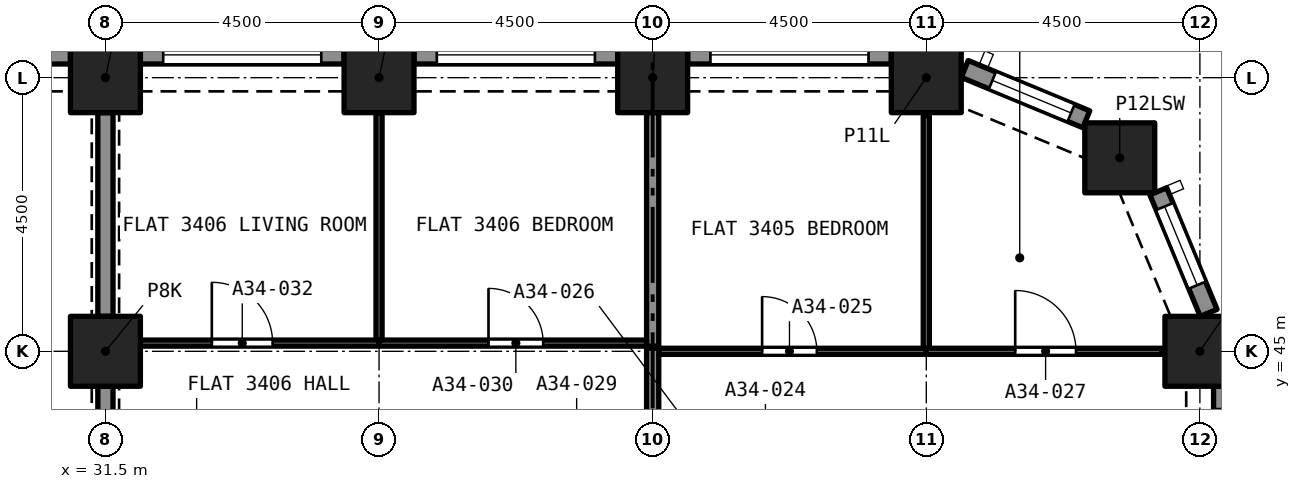
"""IFC4 building model, lengths in metres.
Left out: names, types, materials, properties, quantities, classifications, styles, units other than length and angle.
Written with IfcOpenShell. Run it as: python <this file> out.ifc"""

import sys

from ifc_helpers import new_model, si_unit, direction, frame, frame_2d, origin, origin_2d, place, context, subcontext, project, spatial, rectangle, extrude, element, fill, save


model = new_model("IFC4")
c1 = context("Model", 3, precision=1e-05, world=origin(), true_north=direction((0.0, 1.0)))
c2 = subcontext(c1, "Body", "Model", "MODEL_VIEW")
j1 = project(units=[si_unit("LENGTHUNIT", "METRE"), si_unit("PLANEANGLEUNIT", "RADIAN")], contexts=[c1])
p1 = place(None, origin())
s1 = spatial("IfcSite", under=j1, at=p1, CompositionType="ELEMENT")
p2 = place(p1, origin())
s2 = spatial("IfcBuilding", under=s1, at=p2, CompositionType="ELEMENT")
p3 = place(p2, frame((0.0, 0.0, 121.6)))
s3 = spatial("IfcBuildingStorey", under=s2, at=p3, CompositionType="ELEMENT", Elevation=121.6)
for number, where, z_axis, x_axis in (
    (1, (31.5, 45.0, 0.0), (0.0, 0.0, 1.0), (1.0, 0.0, 0.0)),
    (2, (49.5, 45.0, 0.0), (0.0, 0.0, 1.0), (1.0, 0.0, 0.0)),
    (3, (48.182, 48.182, 0.0), (0.0, 0.0, 1.0), (1.0, 0.0, 0.0)),
    (4, (31.5, 49.5, 0.0), (0.0, 0.0, 1.0), (1.0, 0.0, 0.0)),
    (5, (36.0, 49.5, 0.0), (0.0, 0.0, 1.0), (1.0, 0.0, 0.0)),
    (6, (40.5, 49.5, 0.0), (0.0, 0.0, 1.0), (1.0, 0.0, 0.0)),
    (7, (45.0, 49.5, 0.0), (0.0, 0.0, 1.0), (1.0, 0.0, 0.0)),
):
    element("IfcColumn", number, at=place(p3, frame(where, z_axis=z_axis, x_axis=x_axis)), inside=s3, PredefinedType="COLUMN", context=c2, shape_type="SweptSolid", body=[
        extrude(rectangle(XDim=1.15, YDim=1.15, at=origin_2d()), origin(), (0.0, 0.0, 1.0), 3.2),
    ])
p4 = place(p3, frame((49.875, 44.425, 0.0), z_axis=(0.0, 0.0, 1.0), x_axis=(0.0, -1.0, 0.0)))
e8 = element("IfcWall", 8, at=p4, inside=s3, PredefinedType="SOLIDWALL", context=c2, shape_type="SweptSolid", body=[
    extrude(rectangle(XDim=3.35, YDim=0.3, at=frame_2d((1.675, 0.0))), origin(), (0.0, 0.0, 1.0), 3.2),
])
p5 = place(p4, frame((0.375, 0.0, 0.45)))
e9 = element("IfcOpeningElement", 9, at=p5, cuts=e8, PredefinedType="OPENING", context=c2, shape_type="SweptSolid", body=[
    extrude(rectangle(XDim=2.6, YDim=1.95, at=frame_2d((1.3, 0.975))), frame((0.0, 0.16, 0.0), z_axis=(0.0, -1.0, 0.0), x_axis=(1.0, 0.0, 0.0)), (0.0, 0.0, 1.0), 0.32),
])
p6 = place(p3, frame((48.816, 47.631, 0.0), z_axis=(0.0, 0.0, 1.0), x_axis=(0.382723818695, -0.923862802911, 0.0)))
e10 = element("IfcWall", 10, at=p6, inside=s3, PredefinedType="SOLIDWALL", context=c2, shape_type="SweptSolid", body=[
    extrude(rectangle(XDim=2.164, YDim=0.3, at=frame_2d((1.082, 0.0))), origin(), (0.0, 0.0, 1.0), 3.2),
])
p7 = place(p6, frame((0.271, 0.0, 0.45)))
e11 = element("IfcOpeningElement", 11, at=p7, cuts=e10, PredefinedType="OPENING", context=c2, shape_type="SweptSolid", body=[
    extrude(rectangle(XDim=1.4, YDim=1.95, at=frame_2d((0.7, 0.975))), frame((0.0, 0.16, 0.0), z_axis=(0.0, -1.0, 0.0), x_axis=(1.0, 0.0, 0.0)), (0.0, 0.0, 1.0), 0.32),
])
p8 = place(p3, frame((45.632, 49.644, 0.0), z_axis=(0.0, 0.0, 1.0), x_axis=(0.923862802911, -0.382723818695, 0.0)))
e12 = element("IfcWall", 12, at=p8, inside=s3, PredefinedType="SOLIDWALL", context=c2, shape_type="SweptSolid", body=[
    extrude(rectangle(XDim=2.164, YDim=0.3, at=frame_2d((1.082, 0.0))), origin(), (0.0, 0.0, 1.0), 3.2),
])
p9 = place(p8, frame((0.493, 0.0, 0.45)))
e13 = element("IfcOpeningElement", 13, at=p9, cuts=e12, PredefinedType="OPENING", context=c2, shape_type="SweptSolid", body=[
    extrude(rectangle(XDim=1.4, YDim=1.95, at=frame_2d((0.7, 0.975))), frame((0.0, 0.16, 0.0), z_axis=(0.0, -1.0, 0.0), x_axis=(1.0, 0.0, 0.0)), (0.0, 0.0, 1.0), 0.32),
])
p10 = place(p3, frame((41.075, 49.875, 0.0), z_axis=(0.0, 0.0, 1.0), x_axis=(1.0, 0.0, 0.0)))
e14 = element("IfcWall", 14, at=p10, inside=s3, PredefinedType="SOLIDWALL", context=c2, shape_type="SweptSolid", body=[
    extrude(rectangle(XDim=3.35, YDim=0.3, at=frame_2d((1.675, 0.0))), origin(), (0.0, 0.0, 1.0), 3.2),
])
p11 = place(p10, frame((0.375, 0.0, 0.45)))
e15 = element("IfcOpeningElement", 15, at=p11, cuts=e14, PredefinedType="OPENING", context=c2, shape_type="SweptSolid", body=[
    extrude(rectangle(XDim=2.6, YDim=1.95, at=frame_2d((1.3, 0.975))), frame((0.0, 0.16, 0.0), z_axis=(0.0, -1.0, 0.0), x_axis=(1.0, 0.0, 0.0)), (0.0, 0.0, 1.0), 0.32),
])
p12 = place(p3, frame((36.575, 49.875, 0.0), z_axis=(0.0, 0.0, 1.0), x_axis=(1.0, 0.0, 0.0)))
e16 = element("IfcWall", 16, at=p12, inside=s3, PredefinedType="SOLIDWALL", context=c2, shape_type="SweptSolid", body=[
    extrude(rectangle(XDim=3.35, YDim=0.3, at=frame_2d((1.675, 0.0))), origin(), (0.0, 0.0, 1.0), 3.2),
])
p13 = place(p12, frame((0.375, 0.0, 0.45)))
e17 = element("IfcOpeningElement", 17, at=p13, cuts=e16, PredefinedType="OPENING", context=c2, shape_type="SweptSolid", body=[
    extrude(rectangle(XDim=2.6, YDim=1.95, at=frame_2d((1.3, 0.975))), frame((0.0, 0.16, 0.0), z_axis=(0.0, -1.0, 0.0), x_axis=(1.0, 0.0, 0.0)), (0.0, 0.0, 1.0), 0.32),
])
p14 = place(p3, frame((32.075, 49.875, 0.0), z_axis=(0.0, 0.0, 1.0), x_axis=(1.0, 0.0, 0.0)))
e18 = element("IfcWall", 18, at=p14, inside=s3, PredefinedType="SOLIDWALL", context=c2, shape_type="SweptSolid", body=[
    extrude(rectangle(XDim=3.35, YDim=0.3, at=frame_2d((1.675, 0.0))), origin(), (0.0, 0.0, 1.0), 3.2),
])
p15 = place(p14, frame((0.375, 0.0, 0.45)))
e19 = element("IfcOpeningElement", 19, at=p15, cuts=e18, PredefinedType="OPENING", context=c2, shape_type="SweptSolid", body=[
    extrude(rectangle(XDim=2.6, YDim=1.95, at=frame_2d((1.3, 0.975))), frame((0.0, 0.16, 0.0), z_axis=(0.0, -1.0, 0.0), x_axis=(1.0, 0.0, 0.0)), (0.0, 0.0, 1.0), 0.32),
])
p16 = place(p3, frame((27.575, 49.875, 0.0), z_axis=(0.0, 0.0, 1.0), x_axis=(1.0, 0.0, 0.0)))
e20 = element("IfcWall", 20, at=p16, inside=s3, PredefinedType="SOLIDWALL", context=c2, shape_type="SweptSolid", body=[
    extrude(rectangle(XDim=3.35, YDim=0.3, at=frame_2d((1.675, 0.0))), origin(), (0.0, 0.0, 1.0), 3.2),
])
p17 = place(p16, frame((0.375, 0.0, 0.45)))
e21 = element("IfcOpeningElement", 21, at=p17, cuts=e20, PredefinedType="OPENING", context=c2, shape_type="SweptSolid", body=[
    extrude(rectangle(XDim=2.6, YDim=1.95, at=frame_2d((1.3, 0.975))), frame((0.0, 0.16, 0.0), z_axis=(0.0, -1.0, 0.0), x_axis=(1.0, 0.0, 0.0)), (0.0, 0.0, 1.0), 0.32),
])
p18 = place(p3, frame((40.6, 45.0, 0.0), z_axis=(0.0, 0.0, 1.0), x_axis=(1.0, 0.0, 0.0)))
e22 = element("IfcWall", 22, at=p18, inside=s3, PredefinedType="PARTITIONING", context=c2, shape_type="SweptSolid", body=[
    extrude(rectangle(XDim=4.4, YDim=0.1, at=frame_2d((2.2, 0.0))), origin(), (0.0, 0.0, 1.0), 2.85),
])
p19 = place(p18, frame((1.7, 0.0, 0.0)))
e23 = element("IfcOpeningElement", 23, at=p19, cuts=e22, PredefinedType="OPENING", context=c2, shape_type="SweptSolid", body=[
    extrude(rectangle(XDim=0.9, YDim=2.1, at=frame_2d((0.45, 1.05))), frame((0.0, 0.06, 0.0), z_axis=(0.0, -1.0, 0.0), x_axis=(1.0, 0.0, 0.0)), (0.0, 0.0, 1.0), 0.12),
])
p20 = place(p3, frame((45.0, 45.05, 0.0), z_axis=(0.0, 0.0, 1.0), x_axis=(0.0, 1.0, 0.0)))
e24 = element("IfcWall", 24, at=p20, inside=s3, PredefinedType="PARTITIONING", context=c2, shape_type="SweptSolid", body=[
    extrude(rectangle(XDim=3.828, YDim=0.1, at=frame_2d((1.914, 0.0))), origin(), (0.0, 0.0, 1.0), 2.85),
])
p21 = place(p3, frame((40.5, 45.085, 0.0), z_axis=(0.0, 0.0, 1.0), x_axis=(0.0, 1.0, 0.0)))
e25 = element("IfcWall", 25, at=p21, inside=s3, PredefinedType="PARTITIONING", context=c2, shape_type="SweptSolid", body=[
    extrude(rectangle(XDim=3.84, YDim=0.2, at=frame_2d((1.92, 0.0))), origin(), (0.0, 0.0, 1.0), 2.85),
])
p22 = place(p3, frame((45.0, 45.0, 0.0), z_axis=(0.0, 0.0, 1.0), x_axis=(1.0, 0.0, 0.0)))
e26 = element("IfcWall", 26, at=p22, inside=s3, PredefinedType="PARTITIONING", context=c2, shape_type="SweptSolid", body=[
    extrude(rectangle(XDim=3.878, YDim=0.1, at=frame_2d((1.939, 0.0))), origin(), (0.0, 0.0, 1.0), 2.85),
])
p23 = place(p22, frame((1.462, 0.0, 0.0)))
e27 = element("IfcOpeningElement", 27, at=p23, cuts=e26, PredefinedType="OPENING", context=c2, shape_type="SweptSolid", body=[
    extrude(rectangle(XDim=1.0, YDim=2.1, at=frame_2d((0.5, 1.05))), frame((0.0, 0.06, 0.0), z_axis=(0.0, -1.0, 0.0), x_axis=(1.0, 0.0, 0.0)), (0.0, 0.0, 1.0), 0.12),
])
p24 = place(p3, frame((40.5, 43.692, 0.0), z_axis=(0.0, 0.0, 1.0), x_axis=(0.0, 1.0, 0.0)))
e28 = element("IfcWall", 28, at=p24, inside=s3, PredefinedType="PARTITIONING", context=c2, shape_type="SweptSolid", body=[
    extrude(rectangle(XDim=1.358, YDim=0.2, at=frame_2d((0.679, 0.0))), origin(), (0.0, 0.0, 1.0), 2.85),
])
p25 = place(p3, frame((36.0, 45.135, 0.0), z_axis=(0.0, 0.0, 1.0), x_axis=(1.0, 0.0, 0.0)))
e29 = element("IfcWall", 29, at=p25, inside=s3, PredefinedType="PARTITIONING", context=c2, shape_type="SweptSolid", body=[
    extrude(rectangle(XDim=4.4, YDim=0.1, at=frame_2d((2.2, 0.0))), origin(), (0.0, 0.0, 1.0), 2.85),
])
p26 = place(p25, frame((1.8, 0.0, 0.0)))
e30 = element("IfcOpeningElement", 30, at=p26, cuts=e29, PredefinedType="OPENING", context=c2, shape_type="SweptSolid", body=[
    extrude(rectangle(XDim=0.9, YDim=2.1, at=frame_2d((0.45, 1.05))), frame((0.0, 0.06, 0.0), z_axis=(0.0, -1.0, 0.0), x_axis=(1.0, 0.0, 0.0)), (0.0, 0.0, 1.0), 0.12),
])
p27 = place(p3, frame((36.0, 45.185, 0.0), z_axis=(0.0, 0.0, 1.0), x_axis=(0.0, 1.0, 0.0)))
e31 = element("IfcWall", 31, at=p27, inside=s3, PredefinedType="PARTITIONING", context=c2, shape_type="SweptSolid", body=[
    extrude(rectangle(XDim=3.74, YDim=0.1, at=frame_2d((1.87, 0.0))), origin(), (0.0, 0.0, 1.0), 2.85),
])
p28 = place(p3, frame((32.075, 45.135, 0.0), z_axis=(0.0, 0.0, 1.0), x_axis=(1.0, 0.0, 0.0)))
e32 = element("IfcWall", 32, at=p28, inside=s3, PredefinedType="PARTITIONING", context=c2, shape_type="SweptSolid", body=[
    extrude(rectangle(XDim=3.925, YDim=0.1, at=frame_2d((1.962, 0.0))), origin(), (0.0, 0.0, 1.0), 2.85),
])
p29 = place(p28, frame((1.175, 0.0, 0.0)))
e33 = element("IfcOpeningElement", 33, at=p29, cuts=e32, PredefinedType="OPENING", context=c2, shape_type="SweptSolid", body=[
    extrude(rectangle(XDim=1.0, YDim=2.1, at=frame_2d((0.5, 1.05))), frame((0.0, 0.06, 0.0), z_axis=(0.0, -1.0, 0.0), x_axis=(1.0, 0.0, 0.0)), (0.0, 0.0, 1.0), 0.12),
])
for number, where, z_axis, x_axis in (
    (34, (31.5, 41.075, 0.0), (0.0, 0.0, 1.0), (0.0, 1.0, 0.0)),
    (35, (31.5, 45.575, 0.0), (0.0, 0.0, 1.0), (0.0, 1.0, 0.0)),
):
    element("IfcWall", number, at=place(p3, frame(where, z_axis=z_axis, x_axis=x_axis)), inside=s3, PredefinedType="PARTITIONING", context=c2, shape_type="SweptSolid", body=[
        extrude(rectangle(XDim=3.35, YDim=0.25, at=frame_2d((1.675, 0.0))), origin(), (0.0, 0.0, 1.0), 2.38),
    ])
p30 = place(p7, origin())
e36 = element("IfcWindow", 36, at=p30, inside=s3, PartitioningType="SINGLE_PANEL", PredefinedType="WINDOW", context=c2, shape_type="SweptSolid", body=[
    extrude(rectangle(XDim=1.4, YDim=1.95, at=frame_2d((0.7, 0.975))), frame((0.0, 0.03, 0.0), z_axis=(0.0, -1.0, 0.0), x_axis=(1.0, 0.0, 0.0)), (0.0, 0.0, 1.0), 0.06),
])
fill(e11, e36)
p31 = place(p9, origin())
e37 = element("IfcWindow", 37, at=p31, inside=s3, PartitioningType="SINGLE_PANEL", PredefinedType="WINDOW", context=c2, shape_type="SweptSolid", body=[
    extrude(rectangle(XDim=1.4, YDim=1.95, at=frame_2d((0.7, 0.975))), frame((0.0, 0.03, 0.0), z_axis=(0.0, -1.0, 0.0), x_axis=(1.0, 0.0, 0.0)), (0.0, 0.0, 1.0), 0.06),
])
fill(e13, e37)
p32 = place(p11, origin())
e38 = element("IfcWindow", 38, at=p32, inside=s3, PartitioningType="SINGLE_PANEL", PredefinedType="WINDOW", context=c2, shape_type="SweptSolid", body=[
    extrude(rectangle(XDim=2.6, YDim=1.95, at=frame_2d((1.3, 0.975))), frame((0.0, 0.03, 0.0), z_axis=(0.0, -1.0, 0.0), x_axis=(1.0, 0.0, 0.0)), (0.0, 0.0, 1.0), 0.06),
])
fill(e15, e38)
p33 = place(p13, origin())
e39 = element("IfcWindow", 39, at=p33, inside=s3, PartitioningType="SINGLE_PANEL", PredefinedType="WINDOW", context=c2, shape_type="SweptSolid", body=[
    extrude(rectangle(XDim=2.6, YDim=1.95, at=frame_2d((1.3, 0.975))), frame((0.0, 0.03, 0.0), z_axis=(0.0, -1.0, 0.0), x_axis=(1.0, 0.0, 0.0)), (0.0, 0.0, 1.0), 0.06),
])
fill(e17, e39)
p34 = place(p15, origin())
e40 = element("IfcWindow", 40, at=p34, inside=s3, PartitioningType="SINGLE_PANEL", PredefinedType="WINDOW", context=c2, shape_type="SweptSolid", body=[
    extrude(rectangle(XDim=2.6, YDim=1.95, at=frame_2d((1.3, 0.975))), frame((0.0, 0.03, 0.0), z_axis=(0.0, -1.0, 0.0), x_axis=(1.0, 0.0, 0.0)), (0.0, 0.0, 1.0), 0.06),
])
fill(e19, e40)
p35 = place(p19, origin())
e41 = element("IfcDoor", 41, at=p35, inside=s3, OperationType="SINGLE_SWING_LEFT", PredefinedType="DOOR", context=c2, shape_type="SweptSolid", body=[
    extrude(rectangle(XDim=0.9, YDim=2.1, at=frame_2d((0.45, 1.05))), frame((0.0, 0.025, 0.0), z_axis=(0.0, -1.0, 0.0), x_axis=(1.0, 0.0, 0.0)), (0.0, 0.0, 1.0), 0.05),
])
fill(e23, e41)
p36 = place(p23, origin())
e42 = element("IfcDoor", 42, at=p36, inside=s3, OperationType="SINGLE_SWING_RIGHT", PredefinedType="DOOR", context=c2, shape_type="SweptSolid", body=[
    extrude(rectangle(XDim=1.0, YDim=2.1, at=frame_2d((0.5, 1.05))), frame((0.0, 0.025, 0.0), z_axis=(0.0, -1.0, 0.0), x_axis=(1.0, 0.0, 0.0)), (0.0, 0.0, 1.0), 0.05),
])
fill(e27, e42)
p37 = place(p26, origin())
e43 = element("IfcDoor", 43, at=p37, inside=s3, OperationType="SINGLE_SWING_RIGHT", PredefinedType="DOOR", context=c2, shape_type="SweptSolid", body=[
    extrude(rectangle(XDim=0.9, YDim=2.1, at=frame_2d((0.45, 1.05))), frame((0.0, 0.025, 0.0), z_axis=(0.0, -1.0, 0.0), x_axis=(1.0, 0.0, 0.0)), (0.0, 0.0, 1.0), 0.05),
])
fill(e30, e43)
p38 = place(p29, origin())
e44 = element("IfcDoor", 44, at=p38, inside=s3, OperationType="SINGLE_SWING_LEFT", PredefinedType="DOOR", context=c2, shape_type="SweptSolid", body=[
    extrude(rectangle(XDim=1.0, YDim=2.1, at=frame_2d((0.5, 1.05))), frame((0.0, 0.025, 0.0), z_axis=(0.0, -1.0, 0.0), x_axis=(1.0, 0.0, 0.0)), (0.0, 0.0, 1.0), 0.05),
])
fill(e33, e44)
save(model, sys.argv[1])
